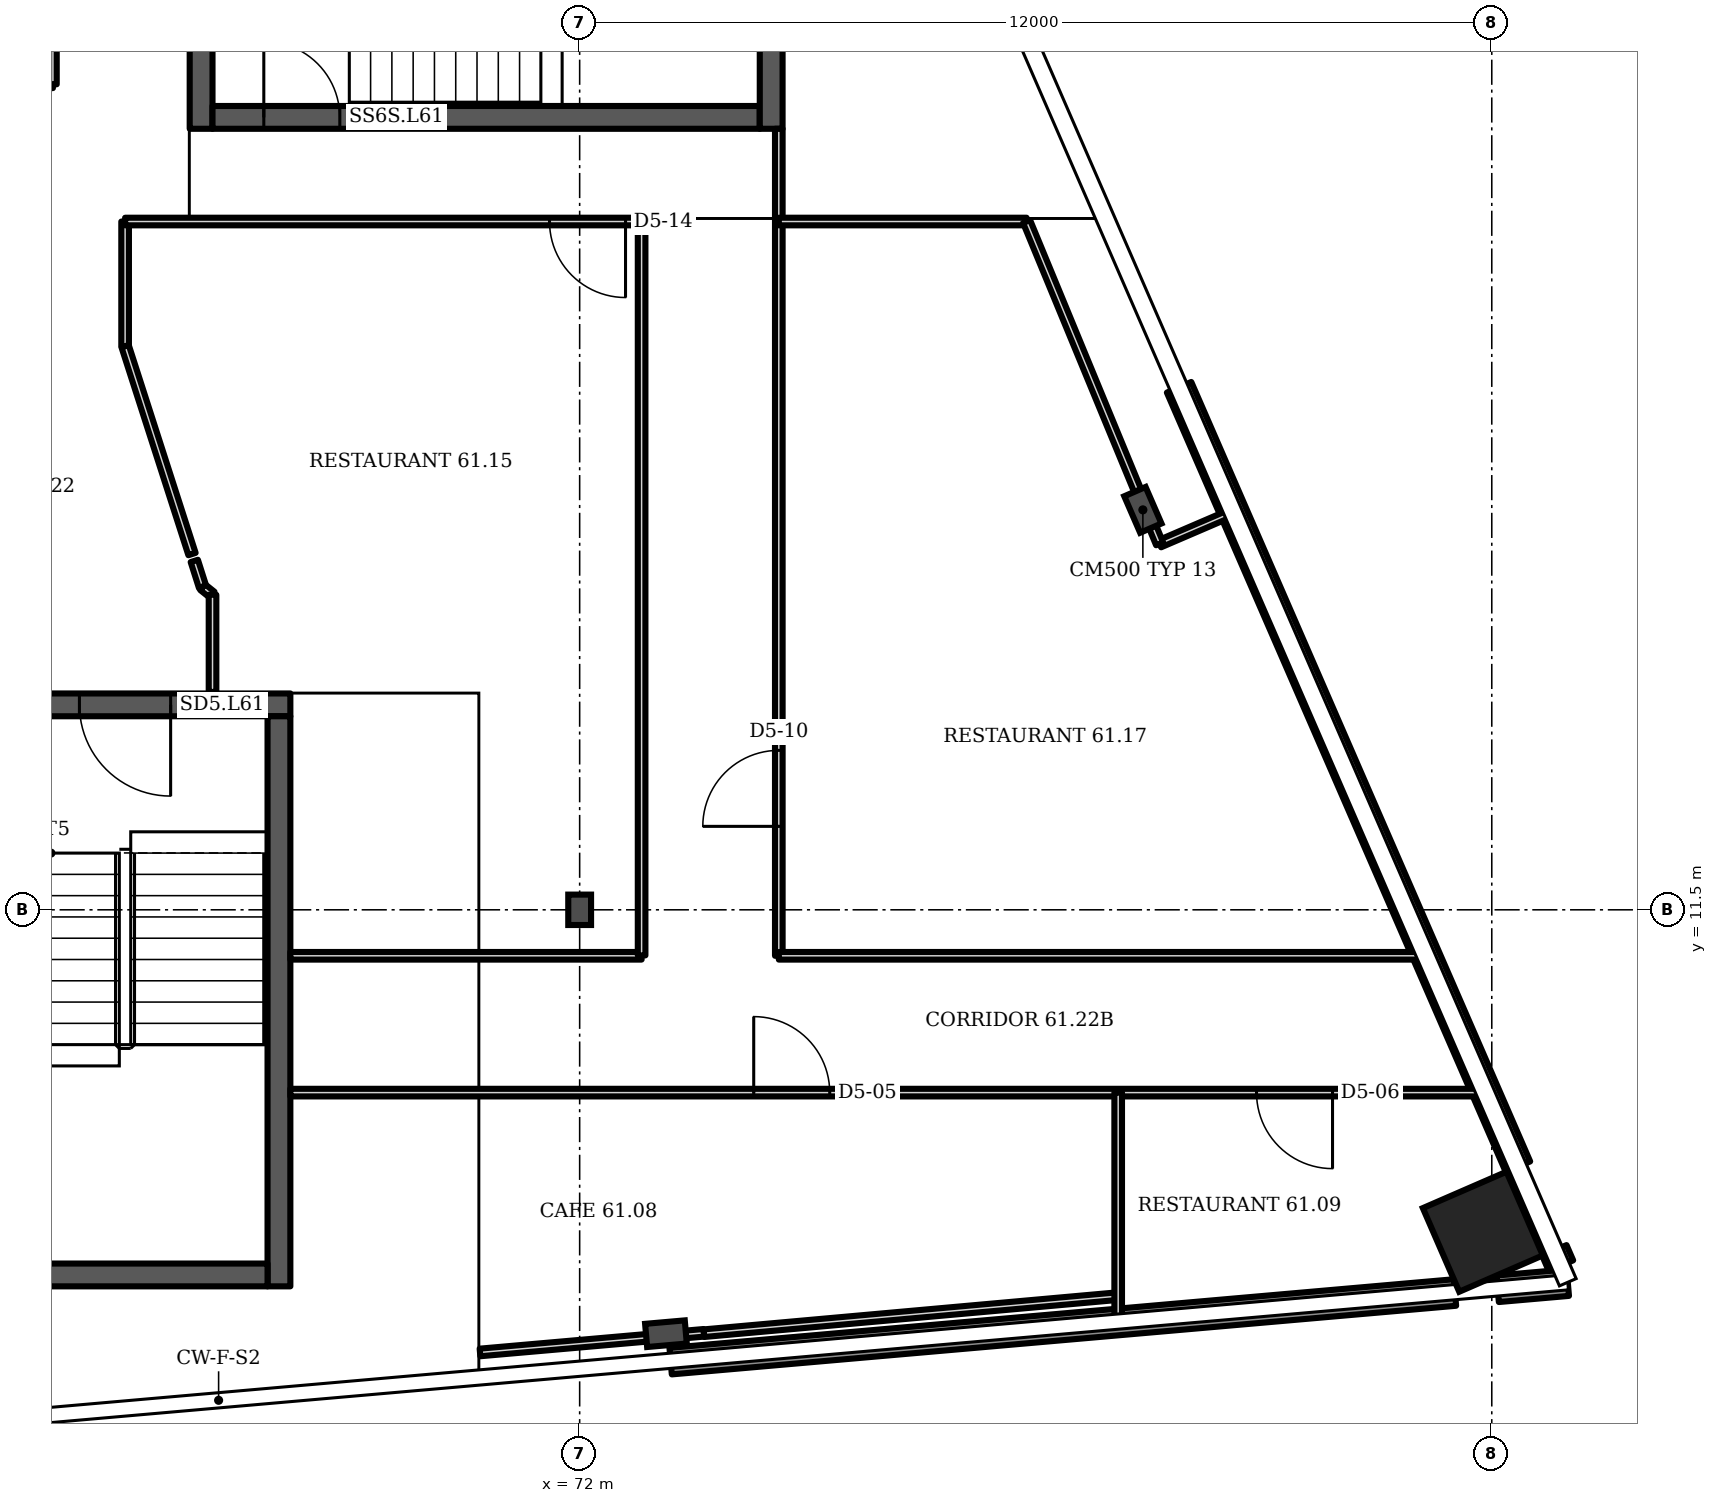
"""IFC4 building model, lengths in metres.
Left out: names, types, materials, properties, quantities, classifications, styles, units other than length and angle.
Written with IfcOpenShell. Run it as: python <this file> out.ifc"""

import sys

from ifc_helpers import new_model, si_unit, direction, frame, frame_2d, origin, origin_2d, place, context, subcontext, project, spatial, rectangle, i_section, extrude, element, fill, save


model = new_model("IFC4")
c1 = context("Model", 3, precision=1e-05, world=origin(), true_north=direction((0.0, 1.0)))
c2 = subcontext(c1, "Body", "Model", "MODEL_VIEW")
j1 = project(units=[si_unit("LENGTHUNIT", "METRE"), si_unit("PLANEANGLEUNIT", "RADIAN")], contexts=[c1])
p1 = place(None, origin())
s1 = spatial("IfcSite", under=j1, at=p1, CompositionType="ELEMENT")
p2 = place(p1, origin())
s2 = spatial("IfcBuilding", under=s1, at=p2, CompositionType="ELEMENT")
p3 = place(p2, frame((0.0, 0.0, 243.1)))
s3 = spatial("IfcBuildingStorey", under=s2, at=p3, CompositionType="ELEMENT", Elevation=243.1)
p4 = place(p3, frame((83.883, 7.265, 0.0), z_axis=(0.0, 0.0, 1.0), x_axis=(-0.398727, 0.917072, 0.0)))
e1 = element("IfcColumn", 1, at=p4, inside=s3, PredefinedType="COLUMN", context=c2, shape_type="SweptSolid", body=[
    extrude(rectangle(XDim=1.2, YDim=1.2, at=origin_2d()), origin(), (0.0, 0.0, 1.0), 3.6),
])
for number, where, z_axis, x_axis in (
    (2, (73.135, 5.923, 0.0), (0.0, 0.0, 1.0), (0.087, -0.996, 0.0)),
    (3, (79.41, 16.762, 0.0), (0.0, 0.0, 1.0), (0.917, 0.399, 0.0)),
):
    element("IfcColumn", number, at=place(p3, frame(where, z_axis=z_axis, x_axis=x_axis)), inside=s3, PredefinedType="COLUMN", context=c2, shape_type="SweptSolid", body=[
        extrude(i_section(OverallWidth=0.306, OverallDepth=0.524, WebThickness=0.021, FlangeThickness=0.04, FilletRadius=0.027, at=origin_2d()), origin(), (0.0, 0.0, 1.0), 3.6),
    ])
p5 = place(p3, frame((72.0, 11.5, 0.0), z_axis=(0.0, 0.0, 1.0), x_axis=(1.0, 0.0, 0.0)))
e4 = element("IfcColumn", 4, at=p5, inside=s3, PredefinedType="COLUMN", context=c2, shape_type="SweptSolid", body=[
    extrude(i_section(OverallWidth=0.3, OverallDepth=0.4, WebThickness=0.013, FlangeThickness=0.024, FilletRadius=0.027, at=origin_2d()), origin(), (0.0, 0.0, 1.0), 3.6),
])
p6 = place(p3, frame((73.197, 5.562, 0.0), z_axis=(0.0, 0.0, 1.0), x_axis=(0.996198, 0.087163, 0.0)))
e5 = element("IfcWall", 5, at=p6, inside=s3, PredefinedType="SOLIDWALL", context=c2, shape_type="SweptSolid", body=[
    extrude(rectangle(XDim=10.358, YDim=0.35, at=frame_2d((5.179, 0.0))), origin(), (0.0, 0.0, 1.0), 1.0),
])
p7 = place(p3, frame((84.078, 6.514, 0.0), z_axis=(0.0, 0.0, 1.0), x_axis=(0.996213, 0.086971, 0.0)))
e6 = element("IfcWall", 6, at=p7, inside=s3, PredefinedType="SOLIDWALL", context=c2, shape_type="SweptSolid", body=[
    extrude(rectangle(XDim=0.926, YDim=0.35, at=frame_2d((0.463, 0.0))), origin(), (0.0, 0.0, 1.0), 1.0),
])
p8 = place(p3, frame((84.91, 6.819, 0.0), z_axis=(0.0, 0.0, 1.0), x_axis=(-0.398359, 0.91723, 0.0)))
e7 = element("IfcWall", 7, at=p8, inside=s3, PredefinedType="SOLIDWALL", context=c2, shape_type="SweptSolid", body=[
    extrude(rectangle(XDim=0.219, YDim=0.35, at=frame_2d((0.109, 0.0))), origin(), (0.0, 0.0, 1.0), 1.0),
])
p9 = place(p3, frame((84.345, 8.12, 0.0), z_axis=(0.0, 0.0, 1.0), x_axis=(-0.398721, 0.917067, 0.0)))
e8 = element("IfcWall", 8, at=p9, inside=s3, PredefinedType="SOLIDWALL", context=c2, shape_type="SweptSolid", body=[
    extrude(rectangle(XDim=11.182, YDim=0.35, at=frame_2d((5.591, 0.0))), origin(), (0.0, 0.0, 1.0), 1.0),
])
p10 = place(p3, frame((63.844, 14.196, 0.0), z_axis=(0.0, 0.0, 1.0), x_axis=(1.0, 0.0, 0.0)))
e9 = element("IfcWall", 9, at=p10, inside=s3, PredefinedType="SHEAR", context=c2, shape_type="SweptSolid", body=[
    extrude(rectangle(XDim=4.35, YDim=0.3, at=frame_2d((2.175, 0.0))), origin(), (0.0, 0.0, 1.0), 3.2),
])
p11 = place(p10, frame((1.575, 0.0, 0.0)))
e10 = element("IfcOpeningElement", 10, at=p11, cuts=e9, PredefinedType="OPENING", context=c2, shape_type="SweptSolid", body=[
    extrude(rectangle(XDim=1.2, YDim=2.1, at=frame_2d((0.6, 1.05))), frame((0.0, 0.16, 0.0), z_axis=(0.0, -1.0, 0.0), x_axis=(1.0, 0.0, 0.0)), (0.0, 0.0, 1.0), 0.32),
])
p12 = place(p3, frame((67.02, 21.775, 0.0), z_axis=(0.0, 0.0, 1.0), x_axis=(0.0, 1.0, 0.0)))
e11 = element("IfcWall", 11, at=p12, inside=s3, PredefinedType="SHEAR", context=c2, shape_type="SweptSolid", body=[
    extrude(rectangle(XDim=4.35, YDim=0.3, at=frame_2d((2.175, 0.0))), origin(), (0.0, 0.0, 1.0), 3.2),
])
p13 = place(p12, frame((1.575, 0.0, 0.0)))
e12 = element("IfcOpeningElement", 12, at=p13, cuts=e11, PredefinedType="OPENING", context=c2, shape_type="SweptSolid", body=[
    extrude(rectangle(XDim=1.2, YDim=2.1, at=frame_2d((0.6, 1.05))), frame((0.0, 0.16, 0.0), z_axis=(0.0, -1.0, 0.0), x_axis=(1.0, 0.0, 0.0)), (0.0, 0.0, 1.0), 0.32),
])
p14 = place(p3, frame((67.17, 21.925, 0.0), z_axis=(0.0, 0.0, 1.0), x_axis=(1.0, 0.0, 0.0)))
e13 = element("IfcWall", 13, at=p14, inside=s3, PredefinedType="SHEAR", context=c2, shape_type="SweptSolid", body=[
    extrude(rectangle(XDim=7.2, YDim=0.3, at=frame_2d((3.6, 0.0))), origin(), (0.0, 0.0, 1.0), 3.2),
])
p15 = place(p14, frame((0.675, 0.0, 0.0)))
e14 = element("IfcOpeningElement", 14, at=p15, cuts=e13, PredefinedType="OPENING", context=c2, shape_type="SweptSolid", body=[
    extrude(rectangle(XDim=1.0, YDim=2.1, at=frame_2d((0.5, 1.05))), frame((0.0, 0.16, 0.0), z_axis=(0.0, -1.0, 0.0), x_axis=(1.0, 0.0, 0.0)), (0.0, 0.0, 1.0), 0.32),
])
p16 = place(p3, frame((65.07, 22.36, 0.0), z_axis=(0.0, 0.0, 1.0), x_axis=(0.0, 1.0, 0.0)))
e15 = element("IfcWall", 15, at=p16, inside=s3, PredefinedType="PARTITIONING", context=c2, shape_type="SweptSolid", body=[
    extrude(rectangle(XDim=3.495, YDim=0.1, at=frame_2d((1.748, 0.0))), origin(), (0.0, 0.0, 1.0), 3.2),
])
p17 = place(p3, frame((66.02, 18.915, 0.0), z_axis=(0.0, 0.0, 1.0), x_axis=(0.0, 1.0, 0.0)))
e16 = element("IfcWall", 16, at=p17, inside=s3, PredefinedType="PARTITIONING", context=c2, shape_type="SweptSolid", body=[
    extrude(rectangle(XDim=1.64, YDim=0.1, at=frame_2d((0.82, 0.0))), origin(), (0.0, 0.0, 1.0), 3.2),
])
p18 = place(p3, frame((66.02, 20.555, 0.0), z_axis=(0.0, 0.0, 1.0), x_axis=(1.0, 0.0, 0.0)))
e17 = element("IfcWall", 17, at=p18, inside=s3, PredefinedType="PARTITIONING", context=c2, shape_type="SweptSolid", body=[
    extrude(rectangle(XDim=6.795, YDim=0.1, at=frame_2d((3.397, 0.0))), origin(), (0.0, 0.0, 1.0), 3.2),
])
p19 = place(p18, frame((5.583, 0.0, 0.0)))
e18 = element("IfcOpeningElement", 18, at=p19, cuts=e17, PredefinedType="OPENING", context=c2, shape_type="SweptSolid", body=[
    extrude(rectangle(XDim=1.0, YDim=2.1, at=frame_2d((0.5, 1.05))), frame((0.0, 0.06, 0.0), z_axis=(0.0, -1.0, 0.0), x_axis=(1.0, 0.0, 0.0)), (0.0, 0.0, 1.0), 0.12),
])
p20 = place(p3, frame((66.9, 16.18, 0.0), z_axis=(0.0, 0.0, 1.0), x_axis=(-0.306242, 0.95195, 0.0)))
e19 = element("IfcWall", 19, at=p20, inside=s3, PredefinedType="PARTITIONING", context=c2, shape_type="SweptSolid", body=[
    extrude(rectangle(XDim=2.873, YDim=0.1, at=frame_2d((1.437, 0.0))), origin(), (0.0, 0.0, 1.0), 3.2),
])
p21 = place(p3, frame((67.04, 15.745, 0.0), z_axis=(0.0, 0.0, 1.0), x_axis=(-0.304065, 0.952647, 0.0)))
e20 = element("IfcWall", 20, at=p21, inside=s3, PredefinedType="PARTITIONING", context=c2, shape_type="SweptSolid", body=[
    extrude(rectangle(XDim=0.362, YDim=0.1, at=frame_2d((0.181, 0.0))), origin(), (0.0, 0.0, 1.0), 3.2),
])
p22 = place(p3, frame((67.165, 15.645, 0.0), z_axis=(0.0, 0.0, 1.0), x_axis=(-0.780569, 0.625065, 0.0)))
e21 = element("IfcWall", 21, at=p22, inside=s3, PredefinedType="PARTITIONING", context=c2, shape_type="SweptSolid", body=[
    extrude(rectangle(XDim=0.16, YDim=0.1, at=frame_2d((0.08, 0.0))), origin(), (0.0, 0.0, 1.0), 3.2),
])
p23 = place(p3, frame((67.17, 14.366, 0.0), z_axis=(0.0, 0.0, 1.0), x_axis=(0.0, 1.0, 0.0)))
e22 = element("IfcWall", 22, at=p23, inside=s3, PredefinedType="PARTITIONING", context=c2, shape_type="SweptSolid", body=[
    extrude(rectangle(XDim=1.279, YDim=0.1, at=frame_2d((0.639, 0.0))), origin(), (0.0, 0.0, 1.0), 3.2),
])
p24 = place(p3, frame((68.194, 9.095, 0.0), z_axis=(0.0, 0.0, 1.0), x_axis=(1.0, 0.0, 0.0)))
e23 = element("IfcWall", 23, at=p24, inside=s3, PredefinedType="PARTITIONING", context=c2, shape_type="SweptSolid", body=[
    extrude(rectangle(XDim=15.699, YDim=0.1, at=frame_2d((7.85, 0.0))), origin(), (0.0, 0.0, 1.0), 2.58),
])
p25 = place(p24, frame((6.096, 0.0, 0.0)))
e24 = element("IfcOpeningElement", 24, at=p25, cuts=e23, PredefinedType="OPENING", context=c2, shape_type="SweptSolid", body=[
    extrude(rectangle(XDim=1.0, YDim=2.1, at=frame_2d((0.5, 1.05))), frame((0.0, 0.06, 0.0), z_axis=(0.0, -1.0, 0.0), x_axis=(1.0, 0.0, 0.0)), (0.0, 0.0, 1.0), 0.12),
])
p26 = place(p24, frame((12.711, 0.0, 0.0)))
e25 = element("IfcOpeningElement", 25, at=p26, cuts=e23, PredefinedType="OPENING", context=c2, shape_type="SweptSolid", body=[
    extrude(rectangle(XDim=1.0, YDim=2.1, at=frame_2d((0.5, 1.05))), frame((0.0, 0.06, 0.0), z_axis=(0.0, -1.0, 0.0), x_axis=(1.0, 0.0, 0.0)), (0.0, 0.0, 1.0), 0.12),
])
p27 = place(p3, frame((68.194, 10.895, 0.0), z_axis=(0.0, 0.0, 1.0), x_axis=(1.0, 0.0, 0.0)))
e26 = element("IfcWall", 26, at=p27, inside=s3, PredefinedType="PARTITIONING", context=c2, shape_type="SweptSolid", body=[
    extrude(rectangle(XDim=4.621, YDim=0.1, at=frame_2d((2.311, 0.0))), origin(), (0.0, 0.0, 1.0), 3.2),
])
p28 = place(p3, frame((70.689, 5.677, 0.0), z_axis=(0.0, 0.0, 1.0), x_axis=(0.996174, 0.087417, 0.0)))
e27 = element("IfcWall", 27, at=p28, inside=s3, PredefinedType="PARTITIONING", context=c2, shape_type="SweptSolid", body=[
    extrude(rectangle(XDim=2.958, YDim=0.1, at=frame_2d((1.479, 0.0))), origin(), (0.0, 0.0, 1.0), 2.58),
])
p29 = place(p3, frame((72.815, 10.9, 0.0), z_axis=(0.0, 0.0, 1.0), x_axis=(0.0, 1.0, 0.0)))
e28 = element("IfcWall", 28, at=p29, inside=s3, PredefinedType="PARTITIONING", context=c2, shape_type="SweptSolid", body=[
    extrude(rectangle(XDim=9.725, YDim=0.1, at=frame_2d((4.863, 0.0))), origin(), (0.0, 0.0, 1.0), 3.2),
])
p30 = place(p3, frame((73.635, 5.93, 0.0), z_axis=(0.0, 0.0, 1.0), x_axis=(0.996013, 0.089228, 0.0)))
e29 = element("IfcWall", 29, at=p30, inside=s3, PredefinedType="PARTITIONING", context=c2, shape_type="SweptSolid", body=[
    extrude(rectangle(XDim=5.437, YDim=0.1, at=frame_2d((2.718, 0.0))), origin(), (0.0, 0.0, 1.0), 2.58),
])
p31 = place(p3, frame((74.62, 10.895, 0.0), z_axis=(0.0, 0.0, 1.0), x_axis=(0.0, 1.0, 0.0)))
e30 = element("IfcWall", 30, at=p31, inside=s3, PredefinedType="PARTITIONING", context=c2, shape_type="SweptSolid", body=[
    extrude(rectangle(XDim=10.88, YDim=0.1, at=frame_2d((5.44, 0.0))), origin(), (0.0, 0.0, 1.0), 3.2),
])
p32 = place(p31, frame((1.703, 0.0, 0.0)))
e31 = element("IfcOpeningElement", 31, at=p32, cuts=e30, PredefinedType="OPENING", context=c2, shape_type="SweptSolid", body=[
    extrude(rectangle(XDim=1.0, YDim=2.1, at=frame_2d((0.5, 1.05))), frame((0.0, 0.06, 0.0), z_axis=(0.0, -1.0, 0.0), x_axis=(1.0, 0.0, 0.0)), (0.0, 0.0, 1.0), 0.12),
])
p33 = place(p3, frame((74.62, 10.895, 0.0), z_axis=(0.0, 0.0, 1.0), x_axis=(1.0, 0.0, 0.0)))
e32 = element("IfcWall", 32, at=p33, inside=s3, PredefinedType="PARTITIONING", context=c2, shape_type="SweptSolid", body=[
    extrude(rectangle(XDim=8.491, YDim=0.1, at=frame_2d((4.245, 0.0))), origin(), (0.0, 0.0, 1.0), 2.58),
])
p34 = place(p3, frame((74.62, 20.555, 0.0), z_axis=(0.0, 0.0, 1.0), x_axis=(1.0, 0.0, 0.0)))
e33 = element("IfcWall", 33, at=p34, inside=s3, PredefinedType="PARTITIONING", context=c2, shape_type="SweptSolid", body=[
    extrude(rectangle(XDim=3.26, YDim=0.1, at=frame_2d((1.63, 0.0))), origin(), (0.0, 0.0, 1.0), 3.2),
])
p35 = place(p3, frame((79.085, 6.12, 0.0), z_axis=(0.0, 0.0, 1.0), x_axis=(0.0, 1.0, 0.0)))
e34 = element("IfcWall", 34, at=p35, inside=s3, PredefinedType="PARTITIONING", context=c2, shape_type="SweptSolid", body=[
    extrude(rectangle(XDim=2.975, YDim=0.1, at=frame_2d((1.487, 0.0))), origin(), (0.0, 0.0, 1.0), 2.58),
])
p36 = place(p3, frame((79.63, 16.315, 0.0), z_axis=(0.0, 0.0, 1.0), x_axis=(0.918616, 0.395147, 0.0)))
e35 = element("IfcWall", 35, at=p36, inside=s3, PredefinedType="PARTITIONING", context=c2, shape_type="SweptSolid", body=[
    extrude(rectangle(XDim=1.031, YDim=0.1, at=frame_2d((0.516, 0.0))), origin(), (0.0, 0.0, 1.0), 2.58),
])
p37 = place(p3, frame((79.63, 16.315, 0.0), z_axis=(0.0, 0.0, 1.0), x_axis=(-0.381517, 0.924359, 0.0)))
e36 = element("IfcWall", 36, at=p37, inside=s3, PredefinedType="PARTITIONING", context=c2, shape_type="SweptSolid", body=[
    extrude(rectangle(XDim=4.587, YDim=0.1, at=frame_2d((2.293, 0.0))), origin(), (0.0, 0.0, 1.0), 3.2),
])
p38 = place(p3, frame((68.044, 6.546, 0.0), z_axis=(0.0, 0.0, 1.0), x_axis=(0.0, 1.0, 0.0)))
e37 = element("IfcWall", 37, at=p38, inside=s3, PredefinedType="SHEAR", context=c2, shape_type="SweptSolid", body=[
    extrude(rectangle(XDim=7.5, YDim=0.3, at=frame_2d((3.75, 0.0))), origin(), (0.0, 0.0, 1.0), 3.2),
])
p39 = place(p3, frame((64.144, 6.696, 0.0), z_axis=(0.0, 0.0, 1.0), x_axis=(1.0, 0.0, 0.0)))
e38 = element("IfcWall", 38, at=p39, inside=s3, PredefinedType="SHEAR", context=c2, shape_type="SweptSolid", body=[
    extrude(rectangle(XDim=3.75, YDim=0.3, at=frame_2d((1.875, 0.0))), origin(), (0.0, 0.0, 1.0), 3.2),
])
p40 = place(p3, frame((74.52, 21.775, 0.0), z_axis=(0.0, 0.0, 1.0), x_axis=(0.0, 1.0, 0.0)))
e39 = element("IfcWall", 39, at=p40, inside=s3, PredefinedType="SHEAR", context=c2, shape_type="SweptSolid", body=[
    extrude(rectangle(XDim=4.05, YDim=0.3, at=frame_2d((2.025, 0.0))), origin(), (0.0, 0.0, 1.0), 3.2),
])
p41 = place(p11, origin())
e40 = element("IfcDoor", 40, at=p41, inside=s3, OperationType="SINGLE_SWING_RIGHT", PredefinedType="DOOR", context=c2, shape_type="SweptSolid", body=[
    extrude(rectangle(XDim=1.2, YDim=2.1, at=frame_2d((0.6, 1.05))), frame((0.0, 0.025, 0.0), z_axis=(0.0, -1.0, 0.0), x_axis=(1.0, 0.0, 0.0)), (0.0, 0.0, 1.0), 0.05),
])
fill(e10, e40)
p42 = place(p15, origin())
e41 = element("IfcDoor", 41, at=p42, inside=s3, OperationType="SINGLE_SWING_LEFT", PredefinedType="DOOR", context=c2, shape_type="SweptSolid", body=[
    extrude(rectangle(XDim=1.0, YDim=2.1, at=frame_2d((0.5, 1.05))), frame((0.0, 0.025, 0.0), z_axis=(0.0, -1.0, 0.0), x_axis=(1.0, 0.0, 0.0)), (0.0, 0.0, 1.0), 0.05),
])
fill(e14, e41)
p43 = place(p25, origin())
e42 = element("IfcDoor", 42, at=p43, inside=s3, OperationType="SINGLE_SWING_LEFT", PredefinedType="DOOR", context=c2, shape_type="SweptSolid", body=[
    extrude(rectangle(XDim=1.0, YDim=2.1, at=frame_2d((0.5, 1.05))), frame((0.0, 0.025, 0.0), z_axis=(0.0, -1.0, 0.0), x_axis=(1.0, 0.0, 0.0)), (0.0, 0.0, 1.0), 0.05),
])
fill(e24, e42)
p44 = place(p26, origin())
e43 = element("IfcDoor", 43, at=p44, inside=s3, OperationType="SINGLE_SWING_RIGHT", PredefinedType="DOOR", context=c2, shape_type="SweptSolid", body=[
    extrude(rectangle(XDim=1.0, YDim=2.1, at=frame_2d((0.5, 1.05))), frame((0.0, 0.025, 0.0), z_axis=(0.0, -1.0, 0.0), x_axis=(1.0, 0.0, 0.0)), (0.0, 0.0, 1.0), 0.05),
])
fill(e25, e43)
p45 = place(p32, origin())
e44 = element("IfcDoor", 44, at=p45, inside=s3, OperationType="SINGLE_SWING_LEFT", PredefinedType="DOOR", context=c2, shape_type="SweptSolid", body=[
    extrude(rectangle(XDim=1.0, YDim=2.1, at=frame_2d((0.5, 1.05))), frame((0.0, 0.025, 0.0), z_axis=(0.0, -1.0, 0.0), x_axis=(1.0, 0.0, 0.0)), (0.0, 0.0, 1.0), 0.05),
])
fill(e31, e44)
p46 = place(p19, origin())
e45 = element("IfcDoor", 45, at=p46, inside=s3, OperationType="SINGLE_SWING_RIGHT", PredefinedType="DOOR", context=c2, shape_type="SweptSolid", body=[
    extrude(rectangle(XDim=1.0, YDim=2.1, at=frame_2d((0.5, 1.05))), frame((0.0, 0.025, 0.0), z_axis=(0.0, -1.0, 0.0), x_axis=(1.0, 0.0, 0.0)), (0.0, 0.0, 1.0), 0.05),
])
fill(e18, e45)
save(model, sys.argv[1])
